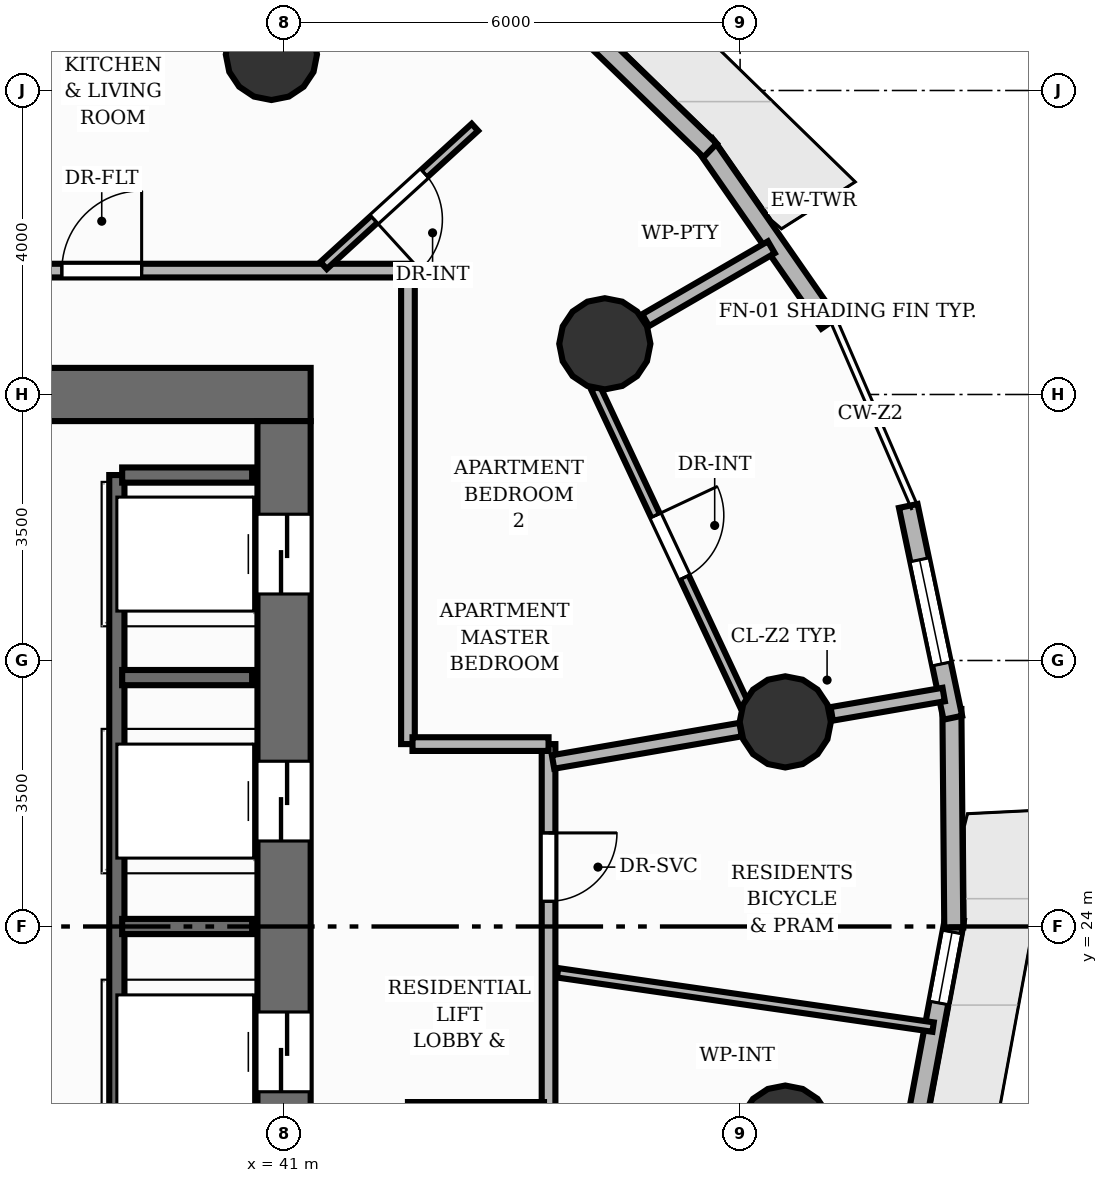
"""IFC4 building model, lengths in metres.
Left out: names, types, materials, properties, quantities, classifications, styles, units other than length and angle.
Written with IfcOpenShell. Run it as: python <this file> out.ifc"""

import sys

from ifc_helpers import new_model, si_unit, direction, frame, frame_2d, origin, origin_2d, place, context, subcontext, project, spatial, rectangle, circle, extrude, element, fill, save


model = new_model("IFC4")
c1 = context("Model", 3, precision=1e-05, world=origin(), true_north=direction((0.0, 1.0)))
c2 = subcontext(c1, "Body", "Model", "MODEL_VIEW")
j1 = project(units=[si_unit("LENGTHUNIT", "METRE"), si_unit("PLANEANGLEUNIT", "RADIAN")], contexts=[c1])
p1 = place(None, origin())
s1 = spatial("IfcSite", under=j1, at=p1, CompositionType="ELEMENT")
p2 = place(p1, origin())
s2 = spatial("IfcBuilding", under=s1, at=p2, CompositionType="ELEMENT")
p3 = place(p2, frame((0.0, 0.0, 74.08)))
s3 = spatial("IfcBuildingStorey", under=s2, at=p3, CompositionType="ELEMENT", Elevation=74.08)
p4 = place(p3, frame((22.65, 31.0, 0.0), z_axis=(0.0, 0.0, 1.0), x_axis=(1.0, 0.0, 0.0)))
e1 = element("IfcWall", 1, at=p4, inside=s3, PredefinedType="SHEAR", context=c2, shape_type="SweptSolid", body=[
    extrude(rectangle(XDim=18.7, YDim=0.7, at=frame_2d((9.35, 0.0))), origin(), (0.0, 0.0, 1.0), 3.2),
])
p5 = place(p4, frame((11.75, 0.0, 0.0)))
e2 = element("IfcOpeningElement", 2, at=p5, cuts=e1, PredefinedType="OPENING", context=c2, shape_type="SweptSolid", body=[
    extrude(rectangle(XDim=1.1, YDim=2.15, at=frame_2d((0.55, 1.075))), frame((0.0, 0.36, 0.0), z_axis=(0.0, -1.0, 0.0), x_axis=(1.0, 0.0, 0.0)), (0.0, 0.0, 1.0), 0.72),
])
p6 = place(p3, frame((41.0, 17.35, 0.0), z_axis=(0.0, 0.0, 1.0), x_axis=(0.0, 1.0, 0.0)))
e3 = element("IfcWall", 3, at=p6, inside=s3, PredefinedType="SHEAR", context=c2, shape_type="SweptSolid", body=[
    extrude(rectangle(XDim=13.3, YDim=0.7, at=frame_2d((6.65, 0.0))), origin(), (0.0, 0.0, 1.0), 3.2),
])
p7 = place(p6, frame((1.225, 0.0, 0.0)))
e4 = element("IfcOpeningElement", 4, at=p7, cuts=e3, PredefinedType="OPENING", context=c2, shape_type="SweptSolid", body=[
    extrude(rectangle(XDim=1.05, YDim=2.15, at=frame_2d((0.525, 1.075))), frame((0.0, 0.36, 0.0), z_axis=(0.0, -1.0, 0.0), x_axis=(1.0, 0.0, 0.0)), (0.0, 0.0, 1.0), 0.72),
])
p8 = place(p6, frame((4.475, 0.0, 0.0)))
e5 = element("IfcOpeningElement", 5, at=p8, cuts=e3, PredefinedType="OPENING", context=c2, shape_type="SweptSolid", body=[
    extrude(rectangle(XDim=1.05, YDim=2.15, at=frame_2d((0.525, 1.075))), frame((0.0, 0.36, 0.0), z_axis=(0.0, -1.0, 0.0), x_axis=(1.0, 0.0, 0.0)), (0.0, 0.0, 1.0), 0.72),
])
p9 = place(p6, frame((7.775, 0.0, 0.0)))
e6 = element("IfcOpeningElement", 6, at=p9, cuts=e3, PredefinedType="OPENING", context=c2, shape_type="SweptSolid", body=[
    extrude(rectangle(XDim=1.05, YDim=2.15, at=frame_2d((0.525, 1.075))), frame((0.0, 0.36, 0.0), z_axis=(0.0, -1.0, 0.0), x_axis=(1.0, 0.0, 0.0)), (0.0, 0.0, 1.0), 0.72),
])
p10 = place(p6, frame((11.025, 0.0, 0.0)))
e7 = element("IfcOpeningElement", 7, at=p10, cuts=e3, PredefinedType="OPENING", context=c2, shape_type="SweptSolid", body=[
    extrude(rectangle(XDim=1.05, YDim=2.15, at=frame_2d((0.525, 1.075))), frame((0.0, 0.36, 0.0), z_axis=(0.0, -1.0, 0.0), x_axis=(1.0, 0.0, 0.0)), (0.0, 0.0, 1.0), 0.72),
])
for number, where, z_axis, x_axis in (
    (8, (47.594, 26.692, 0.0), (0.0, 0.0, 1.0), (1.0, 0.0, 0.0)),
    (9, (45.22, 31.667, 0.0), (0.0, 0.0, 1.0), (1.0, 0.0, 0.0)),
    (10, (40.833, 35.474, 0.0), (0.0, 0.0, 1.0), (1.0, 0.0, 0.0)),
    (11, (47.594, 21.308, 0.0), (0.0, 0.0, 1.0), (1.0, 0.0, 0.0)),
):
    element("IfcColumn", number, at=place(p3, frame(where, z_axis=z_axis, x_axis=x_axis)), inside=s3, PredefinedType="COLUMN", context=c2, shape_type="SweptSolid", body=[
        extrude(circle(Radius=0.6, at=origin_2d()), origin(), (0.0, 0.0, 1.0), 3.2),
    ])
p11 = place(p3, frame((46.532, 34.298, 0.0), z_axis=(0.0, 0.0, 1.0), x_axis=(0.570574087236, -0.821246133005, 0.0)))
e12 = element("IfcWall", 12, at=p11, inside=s3, PredefinedType="SOLIDWALL", context=c2, shape_type="SweptSolid", body=[
    extrude(rectangle(XDim=2.874, YDim=0.25, at=frame_2d((1.437, 0.0))), origin(), (0.0, 0.0, 1.0), 2.96),
])
p12 = place(p3, frame((44.507, 36.247, 0.0), z_axis=(0.0, 0.0, 1.0), x_axis=(0.717880157086, -0.696166704219, 0.0)))
e13 = element("IfcWall", 13, at=p12, inside=s3, PredefinedType="SOLIDWALL", context=c2, shape_type="SweptSolid", body=[
    extrude(rectangle(XDim=2.923, YDim=0.25, at=frame_2d((1.462, 0.0))), origin(), (0.0, 0.0, 1.0), 2.96),
])
p13 = place(p3, frame((49.821, 24.1, 0.0), z_axis=(0.0, 0.0, 1.0), x_axis=(-0.183975908968, -0.982930752861, 0.0)))
e14 = element("IfcWall", 14, at=p13, inside=s3, PredefinedType="SOLIDWALL", context=c2, shape_type="SweptSolid", body=[
    extrude(rectangle(XDim=2.923, YDim=0.25, at=frame_2d((1.462, 0.0))), origin(), (0.0, 0.0, 1.0), 2.96),
])
p14 = place(p13, frame((0.175, 0.0, 0.85)))
e15 = element("IfcOpeningElement", 15, at=p14, cuts=e14, PredefinedType="OPENING", context=c2, shape_type="SweptSolid", body=[
    extrude(rectangle(XDim=0.95, YDim=1.45, at=frame_2d((0.475, 0.725))), frame((0.0, 0.135, 0.0), z_axis=(0.0, -1.0, 0.0), x_axis=(1.0, 0.0, 0.0)), (0.0, 0.0, 1.0), 0.27),
])
p15 = place(p3, frame((49.787, 26.861, 0.0), z_axis=(0.0, 0.0, 1.0), x_axis=(0.008580093639, -0.999963190319, 0.0)))
e16 = element("IfcWall", 16, at=p15, inside=s3, PredefinedType="SOLIDWALL", context=c2, shape_type="SweptSolid", body=[
    extrude(rectangle(XDim=2.874, YDim=0.25, at=frame_2d((1.437, 0.0))), origin(), (0.0, 0.0, 1.0), 2.96),
])
p16 = place(p3, frame((49.213, 29.533, 0.0), z_axis=(0.0, 0.0, 1.0), x_axis=(0.205949984324, -0.978562519187, 0.0)))
e17 = element("IfcWall", 17, at=p16, inside=s3, PredefinedType="SOLIDWALL", context=c2, shape_type="SweptSolid", body=[
    extrude(rectangle(XDim=2.847, YDim=0.25, at=frame_2d((1.424, 0.0))), origin(), (0.0, 0.0, 1.0), 2.96),
])
p17 = place(p16, frame((0.724, 0.0, 0.85)))
e18 = element("IfcOpeningElement", 18, at=p17, cuts=e17, PredefinedType="OPENING", context=c2, shape_type="SweptSolid", body=[
    extrude(rectangle(XDim=1.4, YDim=1.55, at=frame_2d((0.7, 0.775))), frame((0.0, 0.135, 0.0), z_axis=(0.0, -1.0, 0.0), x_axis=(1.0, 0.0, 0.0)), (0.0, 0.0, 1.0), 0.27),
])
p18 = place(p3, frame((38.8, 18.06, 0.0), z_axis=(0.0, 0.0, 1.0), x_axis=(0.0, 1.0, 0.0)))
e19 = element("IfcWall", 19, at=p18, inside=s3, PredefinedType="SHEAR", context=c2, shape_type="SweptSolid", body=[
    extrude(rectangle(XDim=11.88, YDim=0.2, at=frame_2d((5.94, 0.0))), origin(), (0.0, 0.0, 1.0), 3.2),
])
for number, where, z_axis, x_axis in (
    (20, (38.87, 29.94, 0.0), (0.0, 0.0, 1.0), (1.0, 0.0, 0.0)),
    (21, (38.87, 24.0, 0.0), (0.0, 0.0, 1.0), (1.0, 0.0, 0.0)),
    (22, (38.87, 27.275, 0.0), (0.0, 0.0, 1.0), (1.0, 0.0, 0.0)),
):
    element("IfcWall", number, at=place(p3, frame(where, z_axis=z_axis, x_axis=x_axis)), inside=s3, PredefinedType="SHEAR", context=c2, shape_type="SweptSolid", body=[
        extrude(rectangle(XDim=1.71, YDim=0.2, at=frame_2d((0.855, 0.0))), origin(), (0.0, 0.0, 1.0), 3.2),
    ])
p19 = place(p3, frame((48.206, 26.798, 0.0), z_axis=(0.0, 0.0, 1.0), x_axis=(0.985414821555, 0.170169413997, 0.0)))
e23 = element("IfcWall", 23, at=p19, inside=s3, PredefinedType="PARTITIONING", context=c2, shape_type="SweptSolid", body=[
    extrude(rectangle(XDim=1.495, YDim=0.18, at=frame_2d((0.748, 0.0))), origin(), (0.0, 0.0, 1.0), 2.26),
])
p20 = place(p3, frame((45.757, 31.978, 0.0), z_axis=(0.0, 0.0, 1.0), x_axis=(0.86503562166, 0.501710447628, 0.0)))
e24 = element("IfcWall", 24, at=p20, inside=s3, PredefinedType="PARTITIONING", context=c2, shape_type="SweptSolid", body=[
    extrude(rectangle(XDim=1.912, YDim=0.18, at=frame_2d((0.956, 0.0))), origin(), (0.0, 0.0, 1.0), 2.26),
])
p21 = place(p3, frame((44.48, 26.4, 0.0), z_axis=(0.0, 0.0, 1.0), x_axis=(0.0, -1.0, 0.0)))
e25 = element("IfcWall", 25, at=p21, inside=s3, PredefinedType="PARTITIONING", context=c2, shape_type="SweptSolid", body=[
    extrude(rectangle(XDim=4.8, YDim=0.18, at=frame_2d((2.4, 0.0))), origin(), (0.0, 0.0, 1.0), 2.955),
])
p22 = place(p21, frame((1.169, 0.0, 0.0)))
e26 = element("IfcOpeningElement", 26, at=p22, cuts=e25, PredefinedType="OPENING", context=c2, shape_type="SweptSolid", body=[
    extrude(rectangle(XDim=0.9, YDim=2.1, at=frame_2d((0.45, 1.05))), frame((0.0, 0.1, 0.0), z_axis=(0.0, -1.0, 0.0), x_axis=(1.0, 0.0, 0.0)), (0.0, 0.0, 1.0), 0.2),
])
p23 = place(p3, frame((44.42, 21.6, 0.0), z_axis=(0.0, 0.0, 1.0), x_axis=(-1.0, 0.0, 0.0)))
e27 = element("IfcWall", 27, at=p23, inside=s3, PredefinedType="PARTITIONING", context=c2, shape_type="SweptSolid", body=[
    extrude(rectangle(XDim=1.79, YDim=0.18, at=frame_2d((0.895, 0.0))), origin(), (0.0, 0.0, 1.0), 2.26),
])
p24 = place(p3, frame((26.431, 32.63, 0.0), z_axis=(0.0, 0.0, 1.0), x_axis=(1.0, 0.0, 0.0)))
e28 = element("IfcWall", 28, at=p24, inside=s3, PredefinedType="PARTITIONING", context=c2, shape_type="SweptSolid", body=[
    extrude(rectangle(XDim=16.199, YDim=0.18, at=frame_2d((8.099, 0.0))), origin(), (0.0, 0.0, 1.0), 2.955),
])
p25 = place(p24, frame((11.645, 0.0, 0.0)))
e29 = element("IfcOpeningElement", 29, at=p25, cuts=e28, PredefinedType="OPENING", context=c2, shape_type="SweptSolid", body=[
    extrude(rectangle(XDim=1.05, YDim=2.15, at=frame_2d((0.525, 1.075))), frame((0.0, 0.1, 0.0), z_axis=(0.0, -1.0, 0.0), x_axis=(1.0, 0.0, 0.0)), (0.0, 0.0, 1.0), 0.2),
])
p26 = place(p3, frame((42.63, 32.63, 0.0), z_axis=(0.0, 0.0, 1.0), x_axis=(0.0, -1.0, 0.0)))
e30 = element("IfcWall", 30, at=p26, inside=s3, PredefinedType="PARTITIONING", context=c2, shape_type="SweptSolid", body=[
    extrude(rectangle(XDim=6.23, YDim=0.18, at=frame_2d((3.115, 0.0))), origin(), (0.0, 0.0, 1.0), 2.955),
])
p27 = place(p3, frame((42.69, 26.4, 0.0), z_axis=(0.0, 0.0, 1.0), x_axis=(1.0, 0.0, 0.0)))
e31 = element("IfcWall", 31, at=p27, inside=s3, PredefinedType="PARTITIONING", context=c2, shape_type="SweptSolid", body=[
    extrude(rectangle(XDim=1.79, YDim=0.18, at=frame_2d((0.895, 0.0))), origin(), (0.0, 0.0, 1.0), 2.26),
])
p28 = place(p3, frame((49.54, 22.677, 0.0), z_axis=(0.0, 0.0, 1.0), x_axis=(-0.989708433574, 0.143098625124, 0.0)))
e32 = element("IfcWall", 32, at=p28, inside=s3, PredefinedType="PARTITIONING", context=c2, shape_type="SweptSolid", body=[
    extrude(rectangle(XDim=4.992, YDim=0.125, at=frame_2d((2.496, 0.0))), origin(), (0.0, 0.0, 1.0), 2.641),
])
p29 = place(p3, frame((44.539, 26.165, 0.0), z_axis=(0.0, 0.0, 1.0), x_axis=(0.985420684403, 0.170135460006, 0.0)))
e33 = element("IfcWall", 33, at=p29, inside=s3, PredefinedType="PARTITIONING", context=c2, shape_type="SweptSolid", body=[
    extrude(rectangle(XDim=2.504, YDim=0.18, at=frame_2d((1.252, 0.0))), origin(), (0.0, 0.0, 1.0), 2.26),
])
p30 = place(p3, frame((36.424, 34.971, 0.0), z_axis=(0.0, 0.0, 1.0), x_axis=(0.521036660125, 0.853534298553, 0.0)))
e34 = element("IfcWall", 34, at=p30, inside=s3, PredefinedType="PLUMBINGWALL", context=c2, shape_type="SweptSolid", body=[
    extrude(rectangle(XDim=4.803, YDim=0.16, at=frame_2d((2.401, 0.0))), origin(), (0.0, 0.0, 1.0), 2.641),
])
p31 = place(p30, frame((1.951, 0.0, 0.0)))
e35 = element("IfcOpeningElement", 35, at=p31, cuts=e34, PredefinedType="OPENING", context=c2, shape_type="SweptSolid", body=[
    extrude(rectangle(XDim=0.9, YDim=2.1, at=frame_2d((0.45, 1.05))), frame((0.0, 0.09, 0.0), z_axis=(0.0, -1.0, 0.0), x_axis=(1.0, 0.0, 0.0)), (0.0, 0.0, 1.0), 0.18),
])
p32 = place(p3, frame((43.511, 34.516, 0.0), z_axis=(0.0, 0.0, 1.0), x_axis=(-0.738303163636, -0.674469004896, 0.0)))
e36 = element("IfcWall", 36, at=p32, inside=s3, PredefinedType="PARTITIONING", context=c2, shape_type="SweptSolid", body=[
    extrude(rectangle(XDim=2.696, YDim=0.125, at=frame_2d((1.348, 0.0))), origin(), (0.0, 0.0, 1.0), 2.955),
])
p33 = place(p32, frame((0.898, 0.0, 0.0)))
e37 = element("IfcOpeningElement", 37, at=p33, cuts=e36, PredefinedType="OPENING", context=c2, shape_type="SweptSolid", body=[
    extrude(rectangle(XDim=0.9, YDim=2.1, at=frame_2d((0.45, 1.05))), frame((0.0, 0.073, 0.0), z_axis=(0.0, -1.0, 0.0), x_axis=(1.0, 0.0, 0.0)), (0.0, 0.0, 1.0), 0.145),
])
p34 = place(p3, frame((45.098, 31.087, 0.0), z_axis=(0.0, 0.0, 1.0), x_axis=(0.424725570062, -0.905322147158, 0.0)))
e38 = element("IfcWall", 38, at=p34, inside=s3, PredefinedType="PARTITIONING", context=c2, shape_type="SweptSolid", body=[
    extrude(rectangle(XDim=4.61, YDim=0.125, at=frame_2d((2.305, 0.0))), origin(), (0.0, 0.0, 1.0), 2.955),
])
p35 = place(p34, frame((1.855, 0.0, 0.0)))
e39 = element("IfcOpeningElement", 39, at=p35, cuts=e38, PredefinedType="OPENING", context=c2, shape_type="SweptSolid", body=[
    extrude(rectangle(XDim=0.9, YDim=2.1, at=frame_2d((0.45, 1.05))), frame((0.0, 0.073, 0.0), z_axis=(0.0, -1.0, 0.0), x_axis=(1.0, 0.0, 0.0)), (0.0, 0.0, 1.0), 0.145),
])
p36 = place(p14, origin())
e40 = element("IfcWindow", 40, at=p36, inside=s3, PartitioningType="SINGLE_PANEL", PredefinedType="WINDOW", context=c2, shape_type="SweptSolid", body=[
    extrude(rectangle(XDim=0.95, YDim=1.45, at=frame_2d((0.475, 0.725))), frame((0.0, 0.03, 0.0), z_axis=(0.0, -1.0, 0.0), x_axis=(1.0, 0.0, 0.0)), (0.0, 0.0, 1.0), 0.06),
])
fill(e15, e40)
p37 = place(p17, origin())
e41 = element("IfcWindow", 41, at=p37, inside=s3, PartitioningType="SINGLE_PANEL", PredefinedType="WINDOW", context=c2, shape_type="SweptSolid", body=[
    extrude(rectangle(XDim=1.4, YDim=1.55, at=frame_2d((0.7, 0.775))), frame((0.0, 0.03, 0.0), z_axis=(0.0, -1.0, 0.0), x_axis=(1.0, 0.0, 0.0)), (0.0, 0.0, 1.0), 0.06),
])
fill(e18, e41)
p38 = place(p8, origin())
e42 = element("IfcDoor", 42, at=p38, inside=s3, OperationType="DOUBLE_DOOR_SLIDING", PredefinedType="DOOR", context=c2, shape_type="SweptSolid", body=[
    extrude(rectangle(XDim=1.05, YDim=2.15, at=frame_2d((0.525, 1.075))), frame((0.0, 0.025, 0.0), z_axis=(0.0, -1.0, 0.0), x_axis=(1.0, 0.0, 0.0)), (0.0, 0.0, 1.0), 0.05),
])
fill(e5, e42)
p39 = place(p9, origin())
e43 = element("IfcDoor", 43, at=p39, inside=s3, OperationType="DOUBLE_DOOR_SLIDING", PredefinedType="DOOR", context=c2, shape_type="SweptSolid", body=[
    extrude(rectangle(XDim=1.05, YDim=2.15, at=frame_2d((0.525, 1.075))), frame((0.0, 0.025, 0.0), z_axis=(0.0, -1.0, 0.0), x_axis=(1.0, 0.0, 0.0)), (0.0, 0.0, 1.0), 0.05),
])
fill(e6, e43)
p40 = place(p10, origin())
e44 = element("IfcDoor", 44, at=p40, inside=s3, OperationType="DOUBLE_DOOR_SLIDING", PredefinedType="DOOR", context=c2, shape_type="SweptSolid", body=[
    extrude(rectangle(XDim=1.05, YDim=2.15, at=frame_2d((0.525, 1.075))), frame((0.0, 0.025, 0.0), z_axis=(0.0, -1.0, 0.0), x_axis=(1.0, 0.0, 0.0)), (0.0, 0.0, 1.0), 0.05),
])
fill(e7, e44)
p41 = place(p22, origin())
e45 = element("IfcDoor", 45, at=p41, inside=s3, OperationType="SINGLE_SWING_LEFT", PredefinedType="DOOR", context=c2, shape_type="SweptSolid", body=[
    extrude(rectangle(XDim=0.9, YDim=2.1, at=frame_2d((0.45, 1.05))), frame((0.0, 0.025, 0.0), z_axis=(0.0, -1.0, 0.0), x_axis=(1.0, 0.0, 0.0)), (0.0, 0.0, 1.0), 0.05),
])
fill(e26, e45)
p42 = place(p25, origin())
e46 = element("IfcDoor", 46, at=p42, inside=s3, OperationType="SINGLE_SWING_RIGHT", PredefinedType="DOOR", context=c2, shape_type="SweptSolid", body=[
    extrude(rectangle(XDim=1.05, YDim=2.15, at=frame_2d((0.525, 1.075))), frame((0.0, 0.025, 0.0), z_axis=(0.0, -1.0, 0.0), x_axis=(1.0, 0.0, 0.0)), (0.0, 0.0, 1.0), 0.05),
])
fill(e29, e46)
p43 = place(p33, origin())
e47 = element("IfcDoor", 47, at=p43, inside=s3, OperationType="SINGLE_SWING_RIGHT", PredefinedType="DOOR", context=c2, shape_type="SweptSolid", body=[
    extrude(rectangle(XDim=0.9, YDim=2.1, at=frame_2d((0.45, 1.05))), frame((0.0, 0.025, 0.0), z_axis=(0.0, -1.0, 0.0), x_axis=(1.0, 0.0, 0.0)), (0.0, 0.0, 1.0), 0.05),
])
fill(e37, e47)
p44 = place(p35, origin())
e48 = element("IfcDoor", 48, at=p44, inside=s3, OperationType="SINGLE_SWING_LEFT", PredefinedType="DOOR", context=c2, shape_type="SweptSolid", body=[
    extrude(rectangle(XDim=0.9, YDim=2.1, at=frame_2d((0.45, 1.05))), frame((0.0, 0.025, 0.0), z_axis=(0.0, -1.0, 0.0), x_axis=(1.0, 0.0, 0.0)), (0.0, 0.0, 1.0), 0.05),
])
fill(e39, e48)
save(model, sys.argv[1])
